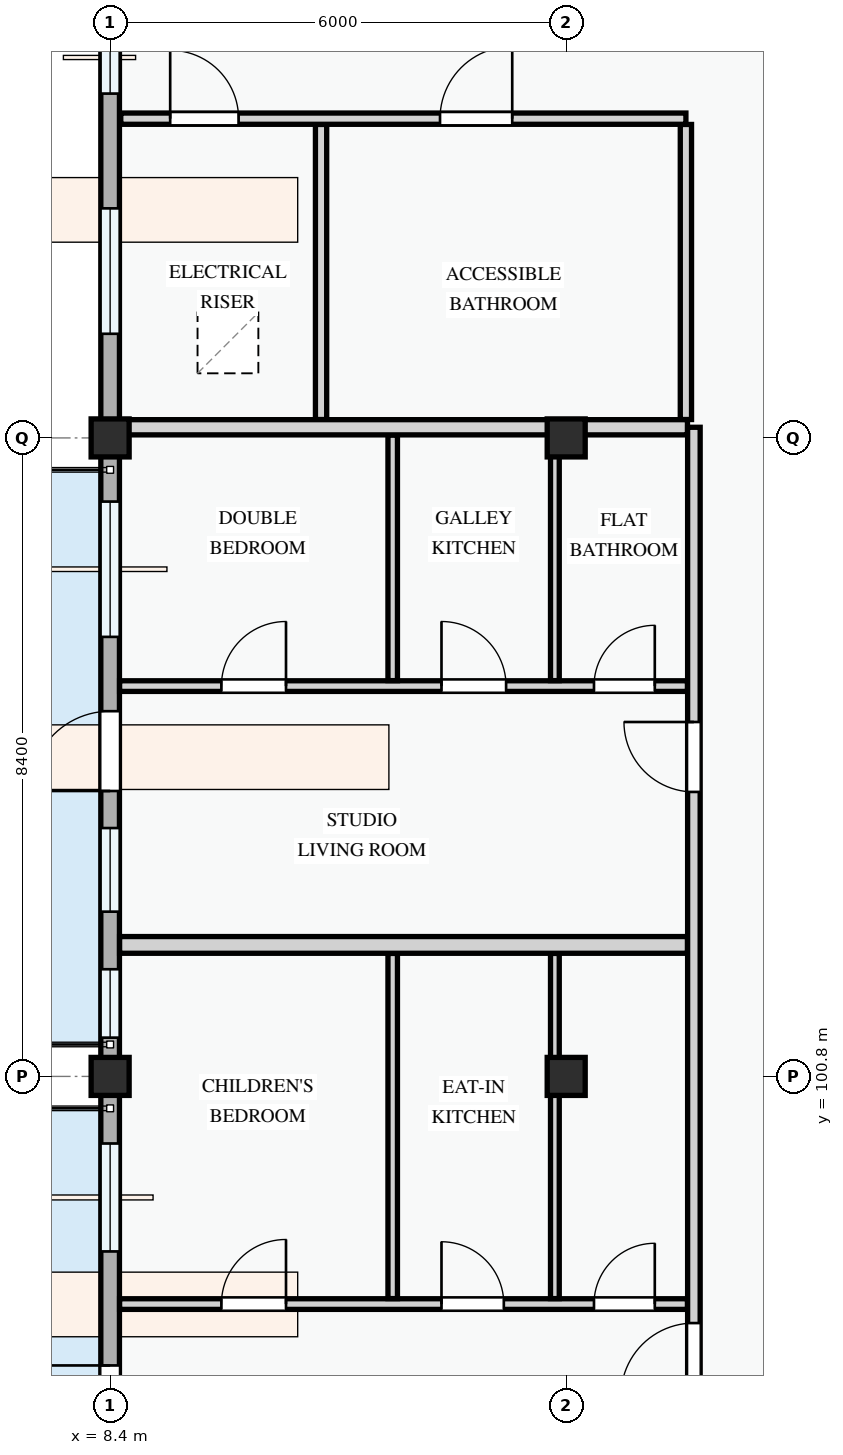
"""IFC4 building model, lengths in metres.
Left out: names, types, materials, properties, quantities, classifications, styles, units other than length and angle.
Written with IfcOpenShell. Run it as: python <this file> out.ifc"""

import sys

from ifc_helpers import new_model, si_unit, direction, frame, frame_2d, origin, origin_2d, place, context, subcontext, project, spatial, rectangle, extrude, element, fill, save


model = new_model("IFC4")
c1 = context("Model", 3, precision=1e-05, world=origin(), true_north=direction((0.0, 1.0)))
c2 = subcontext(c1, "Body", "Model", "MODEL_VIEW")
j1 = project(units=[si_unit("LENGTHUNIT", "METRE"), si_unit("PLANEANGLEUNIT", "RADIAN")], contexts=[c1])
p1 = place(None, origin())
s1 = spatial("IfcSite", under=j1, at=p1, CompositionType="ELEMENT")
p2 = place(p1, origin())
s2 = spatial("IfcBuilding", under=s1, at=p2, CompositionType="ELEMENT")
p3 = place(p2, frame((0.0, 0.0, 41.1)))
s3 = spatial("IfcBuildingStorey", under=s2, at=p3, CompositionType="ELEMENT", Elevation=41.1)
for number, where, z_axis, x_axis in (
    (1, (8.4, 100.8, 0.0), (0.0, 0.0, 1.0), (1.0, 0.0, 0.0)),
    (2, (8.4, 109.2, 0.0), (0.0, 0.0, 1.0), (1.0, 0.0, 0.0)),
    (3, (14.4, 100.8, 0.0), (0.0, 0.0, 1.0), (1.0, 0.0, 0.0)),
    (4, (14.4, 109.2, 0.0), (0.0, 0.0, 1.0), (1.0, 0.0, 0.0)),
):
    element("IfcColumn", number, at=place(p3, frame(where, z_axis=z_axis, x_axis=x_axis)), inside=s3, PredefinedType="COLUMN", context=c2, shape_type="SweptSolid", body=[
        extrude(rectangle(XDim=0.5, YDim=0.5, at=origin_2d()), origin(), (0.0, 0.0, 1.0), 3.3),
    ])
p4 = place(p3, frame((8.4, 115.2, 0.0), z_axis=(0.0, 0.0, 1.0), x_axis=(0.0, -1.0, 0.0)))
e5 = element("IfcWall", 5, at=p4, inside=s3, PredefinedType="STANDARD", context=c2, shape_type="SweptSolid", body=[
    extrude(rectangle(XDim=6.0, YDim=0.245, at=frame_2d((3.0, 0.0))), origin(), (0.0, 0.0, 1.0), 2.445),
])
p5 = place(p4, frame((0.52, 0.0, 0.78)))
e6 = element("IfcOpeningElement", 6, at=p5, cuts=e5, PredefinedType="OPENING", context=c2, shape_type="SweptSolid", body=[
    extrude(rectangle(XDim=0.95, YDim=1.15, at=frame_2d((0.475, 0.575))), frame((0.0, 0.133, 0.0), z_axis=(0.0, -1.0, 0.0), x_axis=(1.0, 0.0, 0.0)), (0.0, 0.0, 1.0), 0.265),
])
p6 = place(p4, frame((2.98, 0.0, 0.78)))
e7 = element("IfcOpeningElement", 7, at=p6, cuts=e5, PredefinedType="OPENING", context=c2, shape_type="SweptSolid", body=[
    extrude(rectangle(XDim=1.65, YDim=1.5, at=frame_2d((0.825, 0.75))), frame((0.0, 0.133, 0.0), z_axis=(0.0, -1.0, 0.0), x_axis=(1.0, 0.0, 0.0)), (0.0, 0.0, 1.0), 0.265),
])
p7 = place(p3, frame((8.4, 109.2, 0.0), z_axis=(0.0, 0.0, 1.0), x_axis=(0.0, -1.0, 0.0)))
e8 = element("IfcWall", 8, at=p7, inside=s3, PredefinedType="STANDARD", context=c2, shape_type="SweptSolid", body=[
    extrude(rectangle(XDim=8.4, YDim=0.245, at=frame_2d((4.2, 0.0))), origin(), (0.0, 0.0, 1.0), 2.345),
])
p8 = place(p7, frame((3.595, 0.0, 0.0)))
e9 = element("IfcOpeningElement", 9, at=p8, cuts=e8, PredefinedType="OPENING", context=c2, shape_type="SweptSolid", body=[
    extrude(rectangle(XDim=1.05, YDim=2.15, at=frame_2d((0.525, 1.075))), frame((0.0, 0.133, 0.0), z_axis=(0.0, -1.0, 0.0), x_axis=(1.0, 0.0, 0.0)), (0.0, 0.0, 1.0), 0.265),
])
p9 = place(p7, frame((0.837, 0.0, 0.78)))
e10 = element("IfcOpeningElement", 10, at=p9, cuts=e8, PredefinedType="OPENING", context=c2, shape_type="SweptSolid", body=[
    extrude(rectangle(XDim=1.78, YDim=1.42, at=frame_2d((0.89, 0.71))), frame((0.0, 0.133, 0.0), z_axis=(0.0, -1.0, 0.0), x_axis=(1.0, 0.0, 0.0)), (0.0, 0.0, 1.0), 0.265),
])
p10 = place(p7, frame((5.133, 0.0, 0.78)))
e11 = element("IfcOpeningElement", 11, at=p10, cuts=e8, PredefinedType="OPENING", context=c2, shape_type="SweptSolid", body=[
    extrude(rectangle(XDim=1.1, YDim=1.3, at=frame_2d((0.55, 0.65))), frame((0.0, 0.133, 0.0), z_axis=(0.0, -1.0, 0.0), x_axis=(1.0, 0.0, 0.0)), (0.0, 0.0, 1.0), 0.265),
])
p11 = place(p7, frame((6.99, 0.0, 0.78)))
e12 = element("IfcOpeningElement", 12, at=p11, cuts=e8, PredefinedType="OPENING", context=c2, shape_type="SweptSolid", body=[
    extrude(rectangle(XDim=0.9, YDim=1.2, at=frame_2d((0.45, 0.6))), frame((0.0, 0.133, 0.0), z_axis=(0.0, -1.0, 0.0), x_axis=(1.0, 0.0, 0.0)), (0.0, 0.0, 1.0), 0.265),
])
p12 = place(p3, frame((8.4, 100.8, 0.0), z_axis=(0.0, 0.0, 1.0), x_axis=(0.0, -1.0, 0.0)))
e13 = element("IfcWall", 13, at=p12, inside=s3, PredefinedType="STANDARD", context=c2, shape_type="SweptSolid", body=[
    extrude(rectangle(XDim=6.0, YDim=0.245, at=frame_2d((3.0, 0.0))), origin(), (0.0, 0.0, 1.0), 2.445),
])
p13 = place(p12, frame((3.802, 0.0, 0.0)))
e14 = element("IfcOpeningElement", 14, at=p13, cuts=e13, PredefinedType="OPENING", context=c2, shape_type="SweptSolid", body=[
    extrude(rectangle(XDim=1.1, YDim=2.15, at=frame_2d((0.55, 1.075))), frame((0.0, 0.133, 0.0), z_axis=(0.0, -1.0, 0.0), x_axis=(1.0, 0.0, 0.0)), (0.0, 0.0, 1.0), 0.265),
])
p14 = place(p12, frame((0.883, 0.0, 0.78)))
e15 = element("IfcOpeningElement", 15, at=p14, cuts=e13, PredefinedType="OPENING", context=c2, shape_type="SweptSolid", body=[
    extrude(rectangle(XDim=1.42, YDim=1.38, at=frame_2d((0.71, 0.69))), frame((0.0, 0.133, 0.0), z_axis=(0.0, -1.0, 0.0), x_axis=(1.0, 0.0, 0.0)), (0.0, 0.0, 1.0), 0.265),
])
for number, where, z_axis, x_axis in (
    (16, (11.175, 113.324, 0.0), (0.0, 0.0, 1.0), (0.0, -1.0, 0.0)),
    (17, (15.975, 113.324, 0.0), (0.0, 0.0, 1.0), (0.0, -1.0, 0.0)),
):
    element("IfcWall", number, at=place(p3, frame(where, z_axis=z_axis, x_axis=x_axis)), inside=s3, PredefinedType="PARTITIONING", context=c2, shape_type="SweptSolid", body=[
        extrude(rectangle(XDim=3.882, YDim=0.148, at=frame_2d((1.941, 0.0))), origin(), (0.0, 0.0, 1.0), 3.0),
    ])
p15 = place(p3, frame((8.54, 113.4, 0.0), z_axis=(0.0, 0.0, 1.0), x_axis=(1.0, 0.0, 0.0)))
e18 = element("IfcWall", 18, at=p15, inside=s3, PredefinedType="PARTITIONING", context=c2, shape_type="SweptSolid", body=[
    extrude(rectangle(XDim=7.435, YDim=0.148, at=frame_2d((3.718, 0.0))), origin(), (0.0, 0.0, 1.0), 3.0),
])
p16 = place(p15, frame((0.65, 0.0, 0.0)))
e19 = element("IfcOpeningElement", 19, at=p16, cuts=e18, PredefinedType="OPENING", context=c2, shape_type="SweptSolid", body=[
    extrude(rectangle(XDim=0.9, YDim=2.1, at=frame_2d((0.45, 1.05))), frame((0.0, 0.084, 0.0), z_axis=(0.0, -1.0, 0.0), x_axis=(1.0, 0.0, 0.0)), (0.0, 0.0, 1.0), 0.168),
])
p17 = place(p15, frame((4.2, 0.0, 0.0)))
e20 = element("IfcOpeningElement", 20, at=p17, cuts=e18, PredefinedType="OPENING", context=c2, shape_type="SweptSolid", body=[
    extrude(rectangle(XDim=0.95, YDim=2.1, at=frame_2d((0.475, 1.05))), frame((0.0, 0.084, 0.0), z_axis=(0.0, -1.0, 0.0), x_axis=(1.0, 0.0, 0.0)), (0.0, 0.0, 1.0), 0.168),
])
p18 = place(p3, frame((8.524, 97.805, 0.0), z_axis=(0.0, 0.0, 1.0), x_axis=(1.0, 0.0, 0.0)))
e21 = element("IfcWall", 21, at=p18, inside=s3, PredefinedType="PARTITIONING", context=c2, shape_type="SweptSolid", body=[
    extrude(rectangle(XDim=7.471, YDim=0.14, at=frame_2d((3.736, 0.0))), origin(), (0.0, 0.0, 1.0), 3.0),
])
p19 = place(p18, frame((1.339, 0.0, 0.0)))
e22 = element("IfcOpeningElement", 22, at=p19, cuts=e21, PredefinedType="OPENING", context=c2, shape_type="SweptSolid", body=[
    extrude(rectangle(XDim=0.85, YDim=2.1, at=frame_2d((0.425, 1.05))), frame((0.0, 0.08, 0.0), z_axis=(0.0, -1.0, 0.0), x_axis=(1.0, 0.0, 0.0)), (0.0, 0.0, 1.0), 0.16),
])
p20 = place(p18, frame((4.235, 0.0, 0.0)))
e23 = element("IfcOpeningElement", 23, at=p20, cuts=e21, PredefinedType="OPENING", context=c2, shape_type="SweptSolid", body=[
    extrude(rectangle(XDim=0.82, YDim=2.08, at=frame_2d((0.41, 1.04))), frame((0.0, 0.08, 0.0), z_axis=(0.0, -1.0, 0.0), x_axis=(1.0, 0.0, 0.0)), (0.0, 0.0, 1.0), 0.16),
])
p21 = place(p18, frame((6.241, 0.0, 0.0)))
e24 = element("IfcOpeningElement", 24, at=p21, cuts=e21, PredefinedType="OPENING", context=c2, shape_type="SweptSolid", body=[
    extrude(rectangle(XDim=0.8, YDim=2.1, at=frame_2d((0.4, 1.05))), frame((0.0, 0.08, 0.0), z_axis=(0.0, -1.0, 0.0), x_axis=(1.0, 0.0, 0.0)), (0.0, 0.0, 1.0), 0.16),
])
p22 = place(p3, frame((12.118, 97.877, 0.0), z_axis=(0.0, 0.0, 1.0), x_axis=(0.0, 1.0, 0.0)))
e25 = element("IfcWall", 25, at=p22, inside=s3, PredefinedType="PARTITIONING", context=c2, shape_type="SweptSolid", body=[
    extrude(rectangle(XDim=4.541, YDim=0.125, at=frame_2d((2.271, 0.0))), origin(), (0.0, 0.0, 1.0), 3.0),
])
p23 = place(p3, frame((14.251, 97.877, 0.0), z_axis=(0.0, 0.0, 1.0), x_axis=(0.0, 1.0, 0.0)))
e26 = element("IfcWall", 26, at=p23, inside=s3, PredefinedType="PARTITIONING", context=c2, shape_type="SweptSolid", body=[
    extrude(rectangle(XDim=4.541, YDim=0.115, at=frame_2d((2.271, 0.0))), origin(), (0.0, 0.0, 1.0), 2.425),
])
p24 = place(p3, frame((8.524, 105.935, 0.0), z_axis=(0.0, 0.0, 1.0), x_axis=(1.0, 0.0, 0.0)))
e27 = element("IfcWall", 27, at=p24, inside=s3, PredefinedType="PARTITIONING", context=c2, shape_type="SweptSolid", body=[
    extrude(rectangle(XDim=7.471, YDim=0.14, at=frame_2d((3.736, 0.0))), origin(), (0.0, 0.0, 1.0), 3.0),
])
p25 = place(p24, frame((1.339, 0.0, 0.0)))
e28 = element("IfcOpeningElement", 28, at=p25, cuts=e27, PredefinedType="OPENING", context=c2, shape_type="SweptSolid", body=[
    extrude(rectangle(XDim=0.85, YDim=2.1, at=frame_2d((0.425, 1.05))), frame((0.0, 0.08, 0.0), z_axis=(0.0, -1.0, 0.0), x_axis=(1.0, 0.0, 0.0)), (0.0, 0.0, 1.0), 0.16),
])
p26 = place(p24, frame((4.235, 0.0, 0.0)))
e29 = element("IfcOpeningElement", 29, at=p26, cuts=e27, PredefinedType="OPENING", context=c2, shape_type="SweptSolid", body=[
    extrude(rectangle(XDim=0.85, YDim=2.1, at=frame_2d((0.425, 1.05))), frame((0.0, 0.08, 0.0), z_axis=(0.0, -1.0, 0.0), x_axis=(1.0, 0.0, 0.0)), (0.0, 0.0, 1.0), 0.16),
])
p27 = place(p24, frame((6.241, 0.0, 0.0)))
e30 = element("IfcOpeningElement", 30, at=p27, cuts=e27, PredefinedType="OPENING", context=c2, shape_type="SweptSolid", body=[
    extrude(rectangle(XDim=0.8, YDim=2.1, at=frame_2d((0.4, 1.05))), frame((0.0, 0.08, 0.0), z_axis=(0.0, -1.0, 0.0), x_axis=(1.0, 0.0, 0.0)), (0.0, 0.0, 1.0), 0.16),
])
p28 = place(p3, frame((12.118, 106.007, 0.0), z_axis=(0.0, 0.0, 1.0), x_axis=(0.0, 1.0, 0.0)))
e31 = element("IfcWall", 31, at=p28, inside=s3, PredefinedType="PARTITIONING", context=c2, shape_type="SweptSolid", body=[
    extrude(rectangle(XDim=3.231, YDim=0.125, at=frame_2d((1.615, 0.0))), origin(), (0.0, 0.0, 1.0), 3.0),
])
p29 = place(p3, frame((14.251, 106.007, 0.0), z_axis=(0.0, 0.0, 1.0), x_axis=(0.0, 1.0, 0.0)))
e32 = element("IfcWall", 32, at=p29, inside=s3, PredefinedType="PARTITIONING", context=c2, shape_type="SweptSolid", body=[
    extrude(rectangle(XDim=3.231, YDim=0.115, at=frame_2d((1.615, 0.0))), origin(), (0.0, 0.0, 1.0), 2.425),
])
p30 = place(p3, frame((8.524, 102.53, 0.0), z_axis=(0.0, 0.0, 1.0), x_axis=(1.0, 0.0, 0.0)))
e33 = element("IfcWall", 33, at=p30, inside=s3, PredefinedType="PARTITIONING", context=c2, shape_type="SweptSolid", body=[
    extrude(rectangle(XDim=7.471, YDim=0.22, at=frame_2d((3.736, 0.0))), origin(), (0.0, 0.0, 1.0), 3.0),
])
p31 = place(p3, frame((8.524, 109.34, 0.0), z_axis=(0.0, 0.0, 1.0), x_axis=(1.0, 0.0, 0.0)))
e34 = element("IfcWall", 34, at=p31, inside=s3, PredefinedType="PARTITIONING", context=c2, shape_type="SweptSolid", body=[
    extrude(rectangle(XDim=7.471, YDim=0.2, at=frame_2d((3.736, 0.0))), origin(), (0.0, 0.0, 1.0), 2.375),
])
p32 = place(p3, frame((16.08, 86.524, 0.0), z_axis=(0.0, 0.0, 1.0), x_axis=(0.0, 1.0, 0.0)))
e35 = element("IfcWall", 35, at=p32, inside=s3, PredefinedType="PARTITIONING", context=c2, shape_type="SweptSolid", body=[
    extrude(rectangle(XDim=22.816, YDim=0.165, at=frame_2d((11.408, 0.0))), origin(), (0.0, 0.0, 1.0), 3.0),
])
p33 = place(p32, frame((2.035, 0.0, 0.0)))
e36 = element("IfcOpeningElement", 36, at=p33, cuts=e35, PredefinedType="OPENING", context=c2, shape_type="SweptSolid", body=[
    extrude(rectangle(XDim=0.92, YDim=2.1, at=frame_2d((0.46, 1.05))), frame((0.0, 0.093, 0.0), z_axis=(0.0, -1.0, 0.0), x_axis=(1.0, 0.0, 0.0)), (0.0, 0.0, 1.0), 0.185),
])
p34 = place(p32, frame((10.071, 0.0, 0.0)))
e37 = element("IfcOpeningElement", 37, at=p34, cuts=e35, PredefinedType="OPENING", context=c2, shape_type="SweptSolid", body=[
    extrude(rectangle(XDim=0.96, YDim=2.12, at=frame_2d((0.48, 1.06))), frame((0.0, 0.093, 0.0), z_axis=(0.0, -1.0, 0.0), x_axis=(1.0, 0.0, 0.0)), (0.0, 0.0, 1.0), 0.185),
])
p35 = place(p32, frame((18.018, 0.0, 0.0)))
e38 = element("IfcOpeningElement", 38, at=p35, cuts=e35, PredefinedType="OPENING", context=c2, shape_type="SweptSolid", body=[
    extrude(rectangle(XDim=0.92, YDim=2.1, at=frame_2d((0.46, 1.05))), frame((0.0, 0.093, 0.0), z_axis=(0.0, -1.0, 0.0), x_axis=(1.0, 0.0, 0.0)), (0.0, 0.0, 1.0), 0.185),
])
p36 = place(p5, origin())
e39 = element("IfcWindow", 39, at=p36, inside=s3, PartitioningType="SINGLE_PANEL", PredefinedType="WINDOW", context=c2, shape_type="SweptSolid", body=[
    extrude(rectangle(XDim=0.95, YDim=1.15, at=frame_2d((0.475, 0.575))), frame((0.0, 0.03, 0.0), z_axis=(0.0, -1.0, 0.0), x_axis=(1.0, 0.0, 0.0)), (0.0, 0.0, 1.0), 0.06),
])
fill(e6, e39)
p37 = place(p6, origin())
e40 = element("IfcWindow", 40, at=p37, inside=s3, PartitioningType="DOUBLE_PANEL_VERTICAL", PredefinedType="WINDOW", context=c2, shape_type="SweptSolid", body=[
    extrude(rectangle(XDim=1.65, YDim=1.5, at=frame_2d((0.825, 0.75))), frame((0.0, 0.03, 0.0), z_axis=(0.0, -1.0, 0.0), x_axis=(1.0, 0.0, 0.0)), (0.0, 0.0, 1.0), 0.06),
])
fill(e7, e40)
p38 = place(p8, frame((1.05, 0.0, 0.0), z_axis=(0.0, 0.0, 1.0), x_axis=(-1.0, 0.0, 0.0)))
e41 = element("IfcDoor", 41, at=p38, inside=s3, OperationType="SINGLE_SWING_LEFT", PredefinedType="DOOR", context=c2, shape_type="SweptSolid", body=[
    extrude(rectangle(XDim=1.05, YDim=2.15, at=frame_2d((0.525, 1.075))), frame((0.0, 0.025, 0.0), z_axis=(0.0, -1.0, 0.0), x_axis=(1.0, 0.0, 0.0)), (0.0, 0.0, 1.0), 0.05),
])
fill(e9, e41)
p39 = place(p9, origin())
e42 = element("IfcWindow", 42, at=p39, inside=s3, PartitioningType="DOUBLE_PANEL_VERTICAL", PredefinedType="WINDOW", context=c2, shape_type="SweptSolid", body=[
    extrude(rectangle(XDim=1.78, YDim=1.42, at=frame_2d((0.89, 0.71))), frame((0.0, 0.03, 0.0), z_axis=(0.0, -1.0, 0.0), x_axis=(1.0, 0.0, 0.0)), (0.0, 0.0, 1.0), 0.06),
])
fill(e10, e42)
p40 = place(p10, origin())
e43 = element("IfcWindow", 43, at=p40, inside=s3, PartitioningType="SINGLE_PANEL", PredefinedType="WINDOW", context=c2, shape_type="SweptSolid", body=[
    extrude(rectangle(XDim=1.1, YDim=1.3, at=frame_2d((0.55, 0.65))), frame((0.0, 0.03, 0.0), z_axis=(0.0, -1.0, 0.0), x_axis=(1.0, 0.0, 0.0)), (0.0, 0.0, 1.0), 0.06),
])
fill(e11, e43)
p41 = place(p11, origin())
e44 = element("IfcWindow", 44, at=p41, inside=s3, PartitioningType="SINGLE_PANEL", PredefinedType="WINDOW", context=c2, shape_type="SweptSolid", body=[
    extrude(rectangle(XDim=0.9, YDim=1.2, at=frame_2d((0.45, 0.6))), frame((0.0, 0.03, 0.0), z_axis=(0.0, -1.0, 0.0), x_axis=(1.0, 0.0, 0.0)), (0.0, 0.0, 1.0), 0.06),
])
fill(e12, e44)
p42 = place(p13, frame((1.1, 0.0, 0.0), z_axis=(0.0, 0.0, 1.0), x_axis=(-1.0, 0.0, 0.0)))
e45 = element("IfcDoor", 45, at=p42, inside=s3, OperationType="SINGLE_SWING_RIGHT", PredefinedType="DOOR", context=c2, shape_type="SweptSolid", body=[
    extrude(rectangle(XDim=1.1, YDim=2.15, at=frame_2d((0.55, 1.075))), frame((0.0, 0.025, 0.0), z_axis=(0.0, -1.0, 0.0), x_axis=(1.0, 0.0, 0.0)), (0.0, 0.0, 1.0), 0.05),
])
fill(e14, e45)
p43 = place(p14, origin())
e46 = element("IfcWindow", 46, at=p43, inside=s3, PartitioningType="SINGLE_PANEL", PredefinedType="WINDOW", context=c2, shape_type="SweptSolid", body=[
    extrude(rectangle(XDim=1.42, YDim=1.38, at=frame_2d((0.71, 0.69))), frame((0.0, 0.03, 0.0), z_axis=(0.0, -1.0, 0.0), x_axis=(1.0, 0.0, 0.0)), (0.0, 0.0, 1.0), 0.06),
])
fill(e15, e46)
p44 = place(p16, origin())
e47 = element("IfcDoor", 47, at=p44, inside=s3, OperationType="SINGLE_SWING_LEFT", PredefinedType="DOOR", context=c2, shape_type="SweptSolid", body=[
    extrude(rectangle(XDim=0.9, YDim=2.1, at=frame_2d((0.45, 1.05))), frame((0.0, 0.025, 0.0), z_axis=(0.0, -1.0, 0.0), x_axis=(1.0, 0.0, 0.0)), (0.0, 0.0, 1.0), 0.05),
])
fill(e19, e47)
p45 = place(p17, origin())
e48 = element("IfcDoor", 48, at=p45, inside=s3, OperationType="SINGLE_SWING_RIGHT", PredefinedType="DOOR", context=c2, shape_type="SweptSolid", body=[
    extrude(rectangle(XDim=0.95, YDim=2.1, at=frame_2d((0.475, 1.05))), frame((0.0, 0.025, 0.0), z_axis=(0.0, -1.0, 0.0), x_axis=(1.0, 0.0, 0.0)), (0.0, 0.0, 1.0), 0.05),
])
fill(e20, e48)
p46 = place(p19, origin())
e49 = element("IfcDoor", 49, at=p46, inside=s3, OperationType="SINGLE_SWING_RIGHT", PredefinedType="DOOR", context=c2, shape_type="SweptSolid", body=[
    extrude(rectangle(XDim=0.85, YDim=2.1, at=frame_2d((0.425, 1.05))), frame((0.0, 0.025, 0.0), z_axis=(0.0, -1.0, 0.0), x_axis=(1.0, 0.0, 0.0)), (0.0, 0.0, 1.0), 0.05),
])
fill(e22, e49)
p47 = place(p20, origin())
e50 = element("IfcDoor", 50, at=p47, inside=s3, OperationType="SINGLE_SWING_LEFT", PredefinedType="DOOR", context=c2, shape_type="SweptSolid", body=[
    extrude(rectangle(XDim=0.82, YDim=2.08, at=frame_2d((0.41, 1.04))), frame((0.0, 0.025, 0.0), z_axis=(0.0, -1.0, 0.0), x_axis=(1.0, 0.0, 0.0)), (0.0, 0.0, 1.0), 0.05),
])
fill(e23, e50)
p48 = place(p21, origin())
e51 = element("IfcDoor", 51, at=p48, inside=s3, OperationType="SINGLE_SWING_RIGHT", PredefinedType="DOOR", context=c2, shape_type="SweptSolid", body=[
    extrude(rectangle(XDim=0.8, YDim=2.1, at=frame_2d((0.4, 1.05))), frame((0.0, 0.025, 0.0), z_axis=(0.0, -1.0, 0.0), x_axis=(1.0, 0.0, 0.0)), (0.0, 0.0, 1.0), 0.05),
])
fill(e24, e51)
p49 = place(p25, origin())
e52 = element("IfcDoor", 52, at=p49, inside=s3, OperationType="SINGLE_SWING_RIGHT", PredefinedType="DOOR", context=c2, shape_type="SweptSolid", body=[
    extrude(rectangle(XDim=0.85, YDim=2.1, at=frame_2d((0.425, 1.05))), frame((0.0, 0.025, 0.0), z_axis=(0.0, -1.0, 0.0), x_axis=(1.0, 0.0, 0.0)), (0.0, 0.0, 1.0), 0.05),
])
fill(e28, e52)
p50 = place(p26, origin())
e53 = element("IfcDoor", 53, at=p50, inside=s3, OperationType="SINGLE_SWING_LEFT", PredefinedType="DOOR", context=c2, shape_type="SweptSolid", body=[
    extrude(rectangle(XDim=0.85, YDim=2.1, at=frame_2d((0.425, 1.05))), frame((0.0, 0.025, 0.0), z_axis=(0.0, -1.0, 0.0), x_axis=(1.0, 0.0, 0.0)), (0.0, 0.0, 1.0), 0.05),
])
fill(e29, e53)
p51 = place(p27, origin())
e54 = element("IfcDoor", 54, at=p51, inside=s3, OperationType="SINGLE_SWING_RIGHT", PredefinedType="DOOR", context=c2, shape_type="SweptSolid", body=[
    extrude(rectangle(XDim=0.8, YDim=2.1, at=frame_2d((0.4, 1.05))), frame((0.0, 0.025, 0.0), z_axis=(0.0, -1.0, 0.0), x_axis=(1.0, 0.0, 0.0)), (0.0, 0.0, 1.0), 0.05),
])
fill(e30, e54)
p52 = place(p34, origin())
e55 = element("IfcDoor", 55, at=p52, inside=s3, OperationType="SINGLE_SWING_LEFT", PredefinedType="DOOR", context=c2, shape_type="SweptSolid", body=[
    extrude(rectangle(XDim=0.96, YDim=2.12, at=frame_2d((0.48, 1.06))), frame((0.0, 0.025, 0.0), z_axis=(0.0, -1.0, 0.0), x_axis=(1.0, 0.0, 0.0)), (0.0, 0.0, 1.0), 0.05),
])
fill(e37, e55)
p53 = place(p35, origin())
e56 = element("IfcDoor", 56, at=p53, inside=s3, OperationType="SINGLE_SWING_RIGHT", PredefinedType="DOOR", context=c2, shape_type="SweptSolid", body=[
    extrude(rectangle(XDim=0.92, YDim=2.1, at=frame_2d((0.46, 1.05))), frame((0.0, 0.025, 0.0), z_axis=(0.0, -1.0, 0.0), x_axis=(1.0, 0.0, 0.0)), (0.0, 0.0, 1.0), 0.05),
])
fill(e38, e56)
save(model, sys.argv[1])
